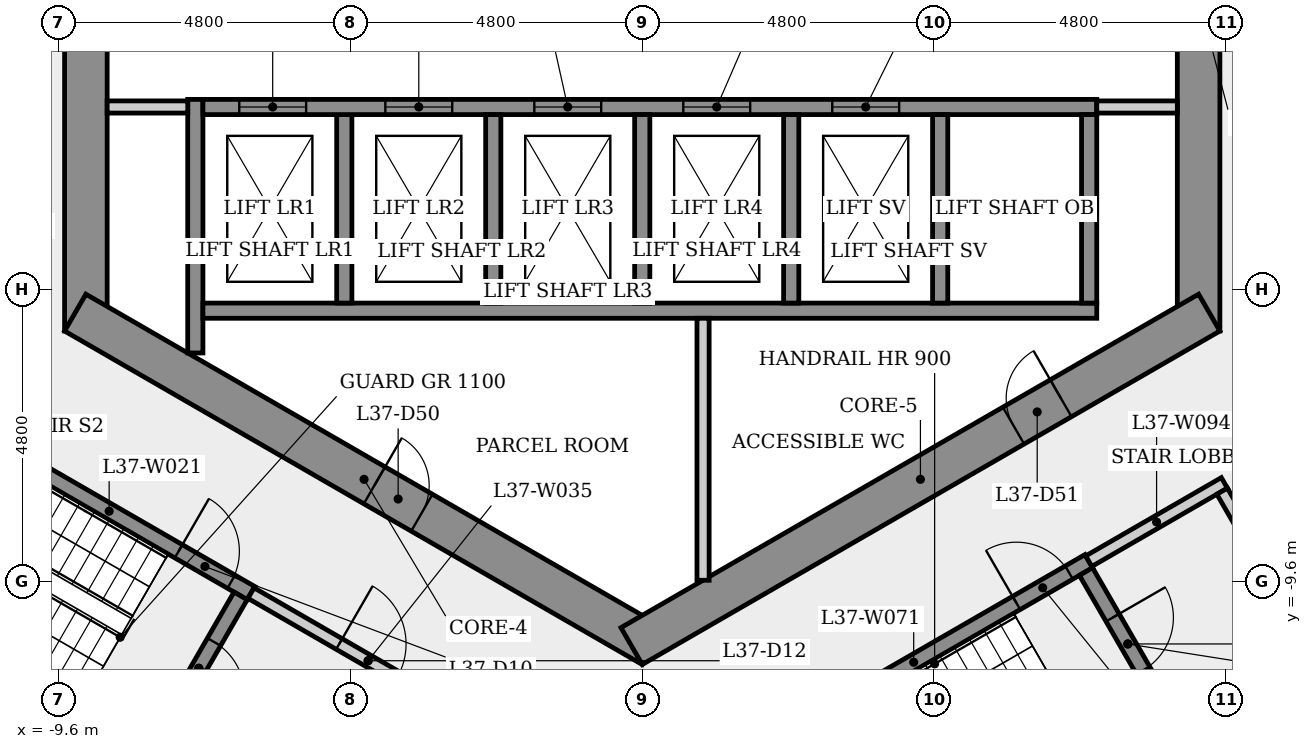
"""IFC4 building model, lengths in metres.
Left out: names, types, materials, properties, quantities, classifications, styles, units other than length and angle.
Written with IfcOpenShell. Run it as: python <this file> out.ifc"""

import sys

from ifc_helpers import new_model, si_unit, direction, frame, frame_2d, origin, place, context, subcontext, project, spatial, rectangle, extrude, element, fill, save


model = new_model("IFC4")
c1 = context("Model", 3, precision=1e-05, world=origin(), true_north=direction((0.0, 1.0)))
c2 = subcontext(c1, "Body", "Model", "MODEL_VIEW")
j1 = project(units=[si_unit("LENGTHUNIT", "METRE"), si_unit("PLANEANGLEUNIT", "RADIAN")], contexts=[c1])
p1 = place(None, origin())
s1 = spatial("IfcSite", under=j1, at=p1, CompositionType="ELEMENT")
p2 = place(p1, origin())
s2 = spatial("IfcBuilding", under=s1, at=p2, CompositionType="ELEMENT")
p3 = place(p2, frame((0.0, 0.0, 139.9)))
s3 = spatial("IfcBuildingStorey", under=s2, at=p3, CompositionType="ELEMENT", Elevation=139.9)
p4 = place(p3, frame((9.15, -5.485, 0.0), z_axis=(0.0, 0.0, 1.0), x_axis=(0.0, 1.0, 0.0)))
e1 = element("IfcWall", 1, at=p4, inside=s3, PredefinedType="SHEAR", context=c2, shape_type="SweptSolid", body=[
    extrude(rectangle(XDim=10.97, YDim=0.7, at=frame_2d((5.485, 0.0))), origin(), (0.0, 0.0, 1.0), 4.0),
])
p5 = place(p4, frame((4.685, 0.0, 0.0)))
e2 = element("IfcOpeningElement", 2, at=p5, cuts=e1, PredefinedType="OPENING", context=c2, shape_type="SweptSolid", body=[
    extrude(rectangle(XDim=1.6, YDim=2.1, at=frame_2d((0.8, 1.05))), frame((0.0, 0.36, 0.0), z_axis=(0.0, -1.0, 0.0), x_axis=(1.0, 0.0, 0.0)), (0.0, 0.0, 1.0), 0.72),
])
p6 = place(p3, frame((-9.15, 5.485, 0.0), z_axis=(0.0, 0.0, 1.0), x_axis=(0.0, -1.0, 0.0)))
e3 = element("IfcWall", 3, at=p6, inside=s3, PredefinedType="SHEAR", context=c2, shape_type="SweptSolid", body=[
    extrude(rectangle(XDim=10.97, YDim=0.7, at=frame_2d((5.485, 0.0))), origin(), (0.0, 0.0, 1.0), 4.0),
])
p7 = place(p6, frame((4.685, 0.0, 0.0)))
e4 = element("IfcOpeningElement", 4, at=p7, cuts=e3, PredefinedType="OPENING", context=c2, shape_type="SweptSolid", body=[
    extrude(rectangle(XDim=1.6, YDim=2.1, at=frame_2d((0.8, 1.05))), frame((0.0, 0.36, 0.0), z_axis=(0.0, -1.0, 0.0), x_axis=(1.0, 0.0, 0.0)), (0.0, 0.0, 1.0), 0.72),
])
p8 = place(p3, frame((-9.325, -5.182, 0.0), z_axis=(0.0, 0.0, 1.0), x_axis=(0.866023993627, -0.500002442456, 0.0)))
e5 = element("IfcWall", 5, at=p8, inside=s3, PredefinedType="SHEAR", context=c2, shape_type="SweptSolid", body=[
    extrude(rectangle(XDim=10.97, YDim=0.7, at=frame_2d((5.485, 0.0))), origin(), (0.0, 0.0, 1.0), 4.0),
])
p9 = place(p8, frame((5.682, 0.0, 0.0)))
e6 = element("IfcOpeningElement", 6, at=p9, cuts=e5, PredefinedType="OPENING", context=c2, shape_type="SweptSolid", body=[
    extrude(rectangle(XDim=0.9, YDim=2.1, at=frame_2d((0.45, 1.05))), frame((0.0, 0.36, 0.0), z_axis=(0.0, -1.0, 0.0), x_axis=(1.0, 0.0, 0.0)), (0.0, 0.0, 1.0), 0.72),
])
p10 = place(p3, frame((-0.175, -10.667, 0.0), z_axis=(0.0, 0.0, 1.0), x_axis=(0.866023993627, 0.500002442456, 0.0)))
e7 = element("IfcWall", 7, at=p10, inside=s3, PredefinedType="SHEAR", context=c2, shape_type="SweptSolid", body=[
    extrude(rectangle(XDim=10.97, YDim=0.7, at=frame_2d((5.485, 0.0))), origin(), (0.0, 0.0, 1.0), 4.0),
])
p11 = place(p10, frame((7.252, 0.0, 0.0)))
e8 = element("IfcOpeningElement", 8, at=p11, cuts=e7, PredefinedType="OPENING", context=c2, shape_type="SweptSolid", body=[
    extrude(rectangle(XDim=0.9, YDim=2.1, at=frame_2d((0.45, 1.05))), frame((0.0, 0.36, 0.0), z_axis=(0.0, -1.0, 0.0), x_axis=(1.0, 0.0, 0.0)), (0.0, 0.0, 1.0), 0.72),
])
p12 = place(p3, frame((-11.1, -7.101, 0.0), z_axis=(0.0, 0.0, 1.0), x_axis=(0.866028615007, -0.499994437958, 0.0)))
e9 = element("IfcWall", 9, at=p12, inside=s3, PredefinedType="SHEAR", context=c2, shape_type="SweptSolid", body=[
    extrude(rectangle(XDim=5.387, YDim=0.25, at=frame_2d((2.694, 0.0))), origin(), (0.0, 0.0, 1.0), 3.6),
])
p13 = place(p12, frame((4.012, 0.0, 0.0)))
e10 = element("IfcOpeningElement", 10, at=p13, cuts=e9, PredefinedType="OPENING", context=c2, shape_type="SweptSolid", body=[
    extrude(rectangle(XDim=1.0, YDim=2.1, at=frame_2d((0.5, 1.05))), frame((0.0, 0.135, 0.0), z_axis=(0.0, -1.0, 0.0), x_axis=(1.0, 0.0, 0.0)), (0.0, 0.0, 1.0), 0.27),
])
p14 = place(p3, frame((-7.935, -12.393, 0.0), z_axis=(0.0, 0.0, 1.0), x_axis=(-0.866025499775, 0.499999833739, 0.0)))
e11 = element("IfcWall", 11, at=p14, inside=s3, PredefinedType="SHEAR", context=c2, shape_type="SweptSolid", body=[
    extrude(rectangle(XDim=6.4, YDim=0.25, at=frame_2d((3.2, 0.0))), origin(), (0.0, 0.0, 1.0), 3.6),
])
p15 = place(p3, frame((-7.35, -5.846, 0.0), z_axis=(0.0, 0.0, 1.0), x_axis=(0.0, 1.0, 0.0)))
e12 = element("IfcWall", 12, at=p15, inside=s3, PredefinedType="SHEAR", context=c2, shape_type="SweptSolid", body=[
    extrude(rectangle(XDim=4.171, YDim=0.25, at=frame_2d((2.085, 0.0))), origin(), (0.0, 0.0, 1.0), 3.6),
])
p16 = place(p3, frame((-7.475, -1.8, 0.0), z_axis=(0.0, 0.0, 1.0), x_axis=(-1.0, 0.0, 0.0)))
e13 = element("IfcWall", 13, at=p16, inside=s3, PredefinedType="PARTITIONING", context=c2, shape_type="SweptSolid", body=[
    extrude(rectangle(XDim=1.325, YDim=0.2, at=frame_2d((0.663, 0.0))), origin(), (0.0, 0.0, 1.0), 3.6),
])
p17 = place(p3, frame((-6.605, -9.841, 0.0), z_axis=(0.0, 0.0, 1.0), x_axis=(-0.499996545922, -0.866027397988, 0.0)))
e14 = element("IfcWall", 14, at=p17, inside=s3, PredefinedType="SHEAR", context=c2, shape_type="SweptSolid", body=[
    extrude(rectangle(XDim=2.75, YDim=0.25, at=frame_2d((1.375, 0.0))), origin(), (0.0, 0.0, 1.0), 3.6),
])
p18 = place(p17, frame((0.875, 0.0, 0.0)))
e15 = element("IfcOpeningElement", 15, at=p18, cuts=e14, PredefinedType="OPENING", context=c2, shape_type="SweptSolid", body=[
    extrude(rectangle(XDim=1.0, YDim=2.1, at=frame_2d((0.5, 1.05))), frame((0.0, 0.135, 0.0), z_axis=(0.0, -1.0, 0.0), x_axis=(1.0, 0.0, 0.0)), (0.0, 0.0, 1.0), 0.27),
])
p19 = place(p3, frame((-6.435, -9.795, 0.0), z_axis=(0.0, 0.0, 1.0), x_axis=(0.866012907634, -0.500021643343, 0.0)))
e16 = element("IfcWall", 16, at=p19, inside=s3, PredefinedType="PARTITIONING", context=c2, shape_type="SweptSolid", body=[
    extrude(rectangle(XDim=4.45, YDim=0.2, at=frame_2d((2.225, 0.0))), origin(), (0.0, 0.0, 1.0), 3.6),
])
p20 = place(p19, frame((1.675, 0.0, 0.0)))
e17 = element("IfcOpeningElement", 17, at=p20, cuts=e16, PredefinedType="OPENING", context=c2, shape_type="SweptSolid", body=[
    extrude(rectangle(XDim=1.1, YDim=2.1, at=frame_2d((0.55, 1.05))), frame((0.0, 0.11, 0.0), z_axis=(0.0, -1.0, 0.0), x_axis=(1.0, 0.0, 0.0)), (0.0, 0.0, 1.0), 0.22),
])
p21 = place(p3, frame((-7.225, -5.15, 0.0), z_axis=(0.0, 0.0, 1.0), x_axis=(1.0, 0.0, 0.0)))
e18 = element("IfcWall", 18, at=p21, inside=s3, PredefinedType="SHEAR", context=c2, shape_type="SweptSolid", body=[
    extrude(rectangle(XDim=14.7, YDim=0.25, at=frame_2d((7.35, 0.0))), origin(), (0.0, 0.0, 1.0), 3.6),
])
p22 = place(p3, frame((-4.9, -1.925, 0.0), z_axis=(0.0, 0.0, 1.0), x_axis=(0.0, -1.0, 0.0)))
e19 = element("IfcWall", 19, at=p22, inside=s3, PredefinedType="SHEAR", context=c2, shape_type="SweptSolid", body=[
    extrude(rectangle(XDim=3.1, YDim=0.25, at=frame_2d((1.55, 0.0))), origin(), (0.0, 0.0, 1.0), 4.0),
])
p23 = place(p3, frame((-7.225, -1.8, 0.0), z_axis=(0.0, 0.0, 1.0), x_axis=(1.0, 0.0, 0.0)))
e20 = element("IfcWall", 20, at=p23, inside=s3, PredefinedType="SHEAR", context=c2, shape_type="SweptSolid", body=[
    extrude(rectangle(XDim=14.7, YDim=0.25, at=frame_2d((7.35, 0.0))), origin(), (0.0, 0.0, 1.0), 3.6),
])
p24 = place(p23, frame((0.597, 0.0, 0.0)))
e21 = element("IfcOpeningElement", 21, at=p24, cuts=e20, PredefinedType="OPENING", context=c2, shape_type="SweptSolid", body=[
    extrude(rectangle(XDim=1.1, YDim=2.1, at=frame_2d((0.55, 1.05))), frame((0.0, 0.135, 0.0), z_axis=(0.0, -1.0, 0.0), x_axis=(1.0, 0.0, 0.0)), (0.0, 0.0, 1.0), 0.27),
])
p25 = place(p23, frame((3.0, 0.0, 0.0)))
e22 = element("IfcOpeningElement", 22, at=p25, cuts=e20, PredefinedType="OPENING", context=c2, shape_type="SweptSolid", body=[
    extrude(rectangle(XDim=1.1, YDim=2.1, at=frame_2d((0.55, 1.05))), frame((0.0, 0.135, 0.0), z_axis=(0.0, -1.0, 0.0), x_axis=(1.0, 0.0, 0.0)), (0.0, 0.0, 1.0), 0.27),
])
p26 = place(p23, frame((5.45, 0.0, 0.0)))
e23 = element("IfcOpeningElement", 23, at=p26, cuts=e20, PredefinedType="OPENING", context=c2, shape_type="SweptSolid", body=[
    extrude(rectangle(XDim=1.1, YDim=2.1, at=frame_2d((0.55, 1.05))), frame((0.0, 0.135, 0.0), z_axis=(0.0, -1.0, 0.0), x_axis=(1.0, 0.0, 0.0)), (0.0, 0.0, 1.0), 0.27),
])
p27 = place(p23, frame((7.9, 0.0, 0.0)))
e24 = element("IfcOpeningElement", 24, at=p27, cuts=e20, PredefinedType="OPENING", context=c2, shape_type="SweptSolid", body=[
    extrude(rectangle(XDim=1.1, YDim=2.1, at=frame_2d((0.55, 1.05))), frame((0.0, 0.135, 0.0), z_axis=(0.0, -1.0, 0.0), x_axis=(1.0, 0.0, 0.0)), (0.0, 0.0, 1.0), 0.27),
])
p28 = place(p23, frame((10.35, 0.0, 0.0)))
e25 = element("IfcOpeningElement", 25, at=p28, cuts=e20, PredefinedType="OPENING", context=c2, shape_type="SweptSolid", body=[
    extrude(rectangle(XDim=1.1, YDim=2.1, at=frame_2d((0.55, 1.05))), frame((0.0, 0.135, 0.0), z_axis=(0.0, -1.0, 0.0), x_axis=(1.0, 0.0, 0.0)), (0.0, 0.0, 1.0), 0.27),
])
for number, where, z_axis, x_axis in (
    (26, (-2.45, -1.925, 0.0), (0.0, 0.0, 1.0), (0.0, -1.0, 0.0)),
    (27, (0.0, -1.925, 0.0), (0.0, 0.0, 1.0), (0.0, -1.0, 0.0)),
):
    element("IfcWall", number, at=place(p3, frame(where, z_axis=z_axis, x_axis=x_axis)), inside=s3, PredefinedType="SHEAR", context=c2, shape_type="SweptSolid", body=[
        extrude(rectangle(XDim=3.1, YDim=0.25, at=frame_2d((1.55, 0.0))), origin(), (0.0, 0.0, 1.0), 4.0),
    ])
p29 = place(p3, frame((1.0, -5.275, 0.0), z_axis=(0.0, 0.0, 1.0), x_axis=(0.0, -1.0, 0.0)))
e28 = element("IfcWall", 28, at=p29, inside=s3, PredefinedType="PARTITIONING", context=c2, shape_type="SweptSolid", body=[
    extrude(rectangle(XDim=4.309, YDim=0.2, at=frame_2d((2.155, 0.0))), origin(), (0.0, 0.0, 1.0), 3.6),
])
p30 = place(p3, frame((1.585, -12.595, 0.0), z_axis=(0.0, 0.0, 1.0), x_axis=(0.866036417653, 0.499980922934, 0.0)))
e29 = element("IfcWall", 29, at=p30, inside=s3, PredefinedType="SHEAR", context=c2, shape_type="SweptSolid", body=[
    extrude(rectangle(XDim=6.65, YDim=0.25, at=frame_2d((3.325, 0.0))), origin(), (0.0, 0.0, 1.0), 3.6),
])
p31 = place(p30, frame((5.275, 0.0, 0.0)))
e30 = element("IfcOpeningElement", 30, at=p31, cuts=e29, PredefinedType="OPENING", context=c2, shape_type="SweptSolid", body=[
    extrude(rectangle(XDim=1.0, YDim=2.1, at=frame_2d((0.5, 1.05))), frame((0.0, 0.135, 0.0), z_axis=(0.0, -1.0, 0.0), x_axis=(1.0, 0.0, 0.0)), (0.0, 0.0, 1.0), 0.27),
])
for number, where, z_axis, x_axis in (
    (31, (2.45, -1.925, 0.0), (0.0, 0.0, 1.0), (0.0, -1.0, 0.0)),
    (32, (4.9, -1.925, 0.0), (0.0, 0.0, 1.0), (0.0, -1.0, 0.0)),
):
    element("IfcWall", number, at=place(p3, frame(where, z_axis=z_axis, x_axis=x_axis)), inside=s3, PredefinedType="SHEAR", context=c2, shape_type="SweptSolid", body=[
        extrude(rectangle(XDim=3.1, YDim=0.25, at=frame_2d((1.55, 0.0))), origin(), (0.0, 0.0, 1.0), 4.0),
    ])
p32 = place(p3, frame((7.298, -9.441, 0.0), z_axis=(0.0, 0.0, 1.0), x_axis=(0.500034990121, -0.866005201286, 0.0)))
e33 = element("IfcWall", 33, at=p32, inside=s3, PredefinedType="SHEAR", context=c2, shape_type="SweptSolid", body=[
    extrude(rectangle(XDim=2.75, YDim=0.25, at=frame_2d((1.375, 0.0))), origin(), (0.0, 0.0, 1.0), 3.6),
])
p33 = place(p32, frame((0.875, 0.0, 0.0)))
e34 = element("IfcOpeningElement", 34, at=p33, cuts=e33, PredefinedType="OPENING", context=c2, shape_type="SweptSolid", body=[
    extrude(rectangle(XDim=1.0, YDim=2.1, at=frame_2d((0.5, 1.05))), frame((0.0, 0.135, 0.0), z_axis=(0.0, -1.0, 0.0), x_axis=(1.0, 0.0, 0.0)), (0.0, 0.0, 1.0), 0.27),
])
p34 = place(p3, frame((7.344, -9.27, 0.0), z_axis=(0.0, 0.0, 1.0), x_axis=(0.866005588531, 0.500034319456, 0.0)))
e35 = element("IfcWall", 35, at=p34, inside=s3, PredefinedType="PARTITIONING", context=c2, shape_type="SweptSolid", body=[
    extrude(rectangle(XDim=2.575, YDim=0.2, at=frame_2d((1.288, 0.0))), origin(), (0.0, 0.0, 1.0), 3.6),
])
p35 = place(p3, frame((7.35, -1.925, 0.0), z_axis=(0.0, 0.0, 1.0), x_axis=(0.0, -1.0, 0.0)))
e36 = element("IfcWall", 36, at=p35, inside=s3, PredefinedType="SHEAR", context=c2, shape_type="SweptSolid", body=[
    extrude(rectangle(XDim=3.1, YDim=0.25, at=frame_2d((1.55, 0.0))), origin(), (0.0, 0.0, 1.0), 4.0),
])
p36 = place(p3, frame((8.8, -1.8, 0.0), z_axis=(0.0, 0.0, 1.0), x_axis=(-1.0, 0.0, 0.0)))
e37 = element("IfcWall", 37, at=p36, inside=s3, PredefinedType="PARTITIONING", context=c2, shape_type="SweptSolid", body=[
    extrude(rectangle(XDim=1.325, YDim=0.2, at=frame_2d((0.663, 0.0))), origin(), (0.0, 0.0, 1.0), 3.6),
])
p37 = place(p3, frame((9.537, -8.119, 0.0), z_axis=(0.0, 0.0, 1.0), x_axis=(0.499990139034, -0.866031096941, 0.0)))
e38 = element("IfcWall", 38, at=p37, inside=s3, PredefinedType="PARTITIONING", context=c2, shape_type="SweptSolid", body=[
    extrude(rectangle(XDim=3.0, YDim=0.2, at=frame_2d((1.5, 0.0))), origin(), (0.0, 0.0, 1.0), 3.6),
])
p38 = place(p37, frame((0.935, 0.0, 0.0)))
e39 = element("IfcOpeningElement", 39, at=p38, cuts=e38, PredefinedType="OPENING", context=c2, shape_type="SweptSolid", body=[
    extrude(rectangle(XDim=1.0, YDim=2.1, at=frame_2d((0.5, 1.05))), frame((0.0, 0.11, 0.0), z_axis=(0.0, -1.0, 0.0), x_axis=(1.0, 0.0, 0.0)), (0.0, 0.0, 1.0), 0.22),
])
p39 = place(p3, frame((10.901, -10.681, 0.0), z_axis=(0.0, 0.0, 1.0), x_axis=(-0.866007538022, -0.500030943131, 0.0)))
e40 = element("IfcWall", 40, at=p39, inside=s3, PredefinedType="PLUMBINGWALL", context=c2, shape_type="SweptSolid", body=[
    extrude(rectangle(XDim=2.375, YDim=0.2, at=frame_2d((1.188, 0.0))), origin(), (0.0, 0.0, 1.0), 3.6),
])
p40 = place(p24, origin())
e41 = element("IfcDoor", 41, at=p40, inside=s3, OperationType="SLIDING_TO_LEFT", PredefinedType="DOOR", context=c2, shape_type="SweptSolid", body=[
    extrude(rectangle(XDim=1.1, YDim=2.1, at=frame_2d((0.55, 1.05))), frame((0.0, 0.025, 0.0), z_axis=(0.0, -1.0, 0.0), x_axis=(1.0, 0.0, 0.0)), (0.0, 0.0, 1.0), 0.05),
])
fill(e21, e41)
p41 = place(p25, origin())
e42 = element("IfcDoor", 42, at=p41, inside=s3, OperationType="SLIDING_TO_LEFT", PredefinedType="DOOR", context=c2, shape_type="SweptSolid", body=[
    extrude(rectangle(XDim=1.1, YDim=2.1, at=frame_2d((0.55, 1.05))), frame((0.0, 0.025, 0.0), z_axis=(0.0, -1.0, 0.0), x_axis=(1.0, 0.0, 0.0)), (0.0, 0.0, 1.0), 0.05),
])
fill(e22, e42)
p42 = place(p26, origin())
e43 = element("IfcDoor", 43, at=p42, inside=s3, OperationType="SLIDING_TO_LEFT", PredefinedType="DOOR", context=c2, shape_type="SweptSolid", body=[
    extrude(rectangle(XDim=1.1, YDim=2.1, at=frame_2d((0.55, 1.05))), frame((0.0, 0.025, 0.0), z_axis=(0.0, -1.0, 0.0), x_axis=(1.0, 0.0, 0.0)), (0.0, 0.0, 1.0), 0.05),
])
fill(e23, e43)
p43 = place(p27, origin())
e44 = element("IfcDoor", 44, at=p43, inside=s3, OperationType="SLIDING_TO_LEFT", PredefinedType="DOOR", context=c2, shape_type="SweptSolid", body=[
    extrude(rectangle(XDim=1.1, YDim=2.1, at=frame_2d((0.55, 1.05))), frame((0.0, 0.025, 0.0), z_axis=(0.0, -1.0, 0.0), x_axis=(1.0, 0.0, 0.0)), (0.0, 0.0, 1.0), 0.05),
])
fill(e24, e44)
p44 = place(p28, origin())
e45 = element("IfcDoor", 45, at=p44, inside=s3, OperationType="SLIDING_TO_LEFT", PredefinedType="DOOR", context=c2, shape_type="SweptSolid", body=[
    extrude(rectangle(XDim=1.1, YDim=2.1, at=frame_2d((0.55, 1.05))), frame((0.0, 0.025, 0.0), z_axis=(0.0, -1.0, 0.0), x_axis=(1.0, 0.0, 0.0)), (0.0, 0.0, 1.0), 0.05),
])
fill(e25, e45)
p45 = place(p13, origin())
e46 = element("IfcDoor", 46, at=p45, inside=s3, OperationType="SINGLE_SWING_LEFT", PredefinedType="DOOR", context=c2, shape_type="SweptSolid", body=[
    extrude(rectangle(XDim=1.0, YDim=2.1, at=frame_2d((0.5, 1.05))), frame((0.0, 0.025, 0.0), z_axis=(0.0, -1.0, 0.0), x_axis=(1.0, 0.0, 0.0)), (0.0, 0.0, 1.0), 0.05),
])
fill(e10, e46)
p46 = place(p18, origin())
e47 = element("IfcDoor", 47, at=p46, inside=s3, OperationType="SINGLE_SWING_RIGHT", PredefinedType="DOOR", context=c2, shape_type="SweptSolid", body=[
    extrude(rectangle(XDim=1.0, YDim=2.1, at=frame_2d((0.5, 1.05))), frame((0.0, 0.025, 0.0), z_axis=(0.0, -1.0, 0.0), x_axis=(1.0, 0.0, 0.0)), (0.0, 0.0, 1.0), 0.05),
])
fill(e15, e47)
p47 = place(p20, origin())
e48 = element("IfcDoor", 48, at=p47, inside=s3, OperationType="SINGLE_SWING_LEFT", PredefinedType="DOOR", context=c2, shape_type="SweptSolid", body=[
    extrude(rectangle(XDim=1.1, YDim=2.1, at=frame_2d((0.55, 1.05))), frame((0.0, 0.025, 0.0), z_axis=(0.0, -1.0, 0.0), x_axis=(1.0, 0.0, 0.0)), (0.0, 0.0, 1.0), 0.05),
])
fill(e17, e48)
p48 = place(p31, origin())
e49 = element("IfcDoor", 49, at=p48, inside=s3, OperationType="SINGLE_SWING_LEFT", PredefinedType="DOOR", context=c2, shape_type="SweptSolid", body=[
    extrude(rectangle(XDim=1.0, YDim=2.1, at=frame_2d((0.5, 1.05))), frame((0.0, 0.025, 0.0), z_axis=(0.0, -1.0, 0.0), x_axis=(1.0, 0.0, 0.0)), (0.0, 0.0, 1.0), 0.05),
])
fill(e30, e49)
p49 = place(p33, origin())
e50 = element("IfcDoor", 50, at=p49, inside=s3, OperationType="SINGLE_SWING_LEFT", PredefinedType="DOOR", context=c2, shape_type="SweptSolid", body=[
    extrude(rectangle(XDim=1.0, YDim=2.1, at=frame_2d((0.5, 1.05))), frame((0.0, 0.025, 0.0), z_axis=(0.0, -1.0, 0.0), x_axis=(1.0, 0.0, 0.0)), (0.0, 0.0, 1.0), 0.05),
])
fill(e34, e50)
p50 = place(p9, origin())
e51 = element("IfcDoor", 51, at=p50, inside=s3, OperationType="SINGLE_SWING_LEFT", PredefinedType="DOOR", context=c2, shape_type="SweptSolid", body=[
    extrude(rectangle(XDim=0.9, YDim=2.1, at=frame_2d((0.45, 1.05))), frame((0.0, 0.025, 0.0), z_axis=(0.0, -1.0, 0.0), x_axis=(1.0, 0.0, 0.0)), (0.0, 0.0, 1.0), 0.05),
])
fill(e6, e51)
p51 = place(p11, origin())
e52 = element("IfcDoor", 52, at=p51, inside=s3, OperationType="SINGLE_SWING_RIGHT", PredefinedType="DOOR", context=c2, shape_type="SweptSolid", body=[
    extrude(rectangle(XDim=0.9, YDim=2.1, at=frame_2d((0.45, 1.05))), frame((0.0, 0.025, 0.0), z_axis=(0.0, -1.0, 0.0), x_axis=(1.0, 0.0, 0.0)), (0.0, 0.0, 1.0), 0.05),
])
fill(e8, e52)
save(model, sys.argv[1])
